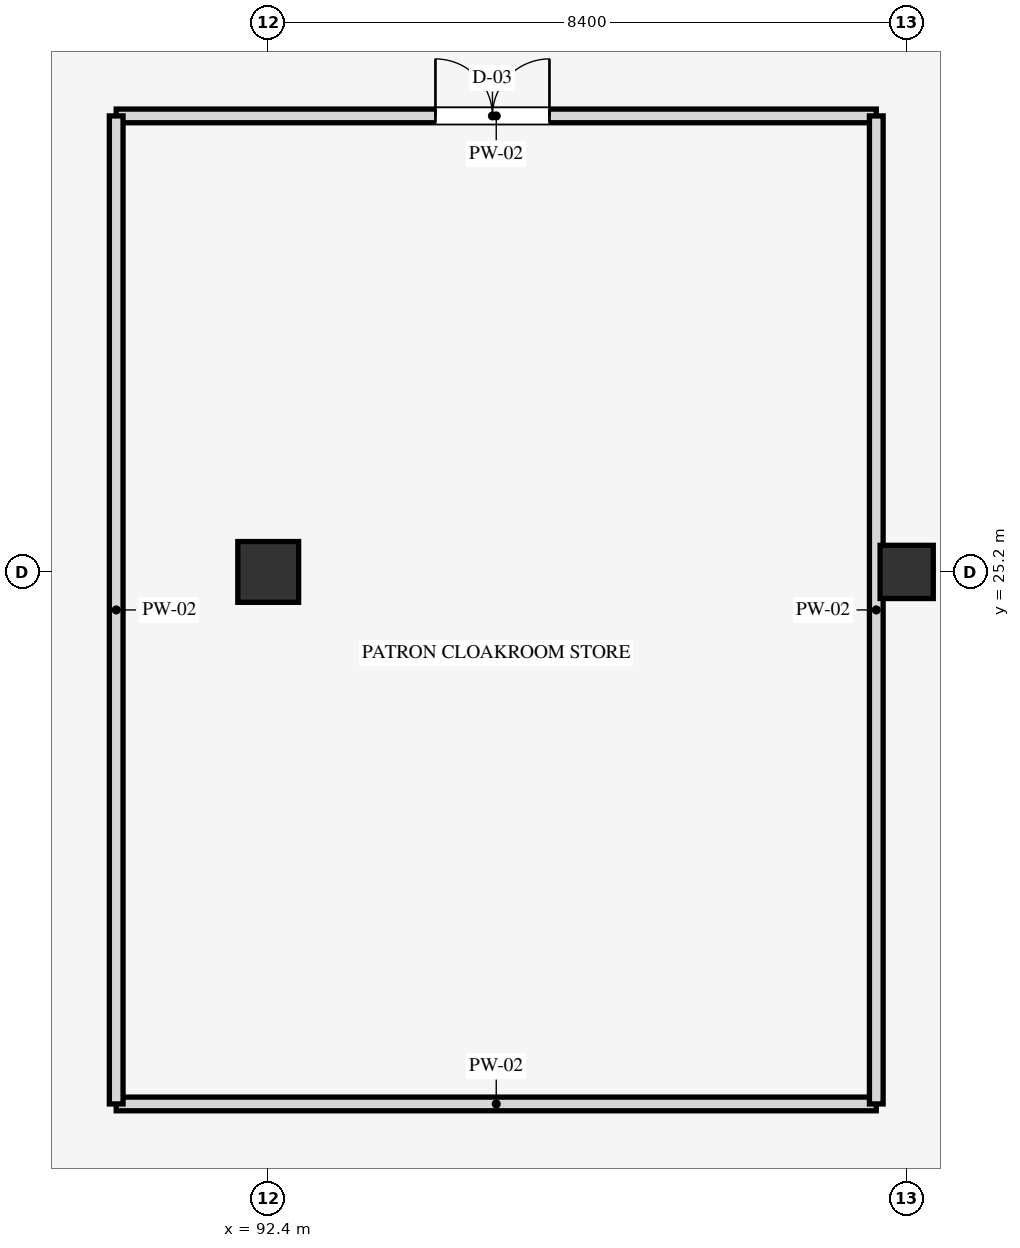
"""IFC4 building model, lengths in metres.
Left out: names, types, materials, properties, quantities, classifications, styles, units other than length and angle.
Written with IfcOpenShell. Run it as: python <this file> out.ifc"""

import sys

from ifc_helpers import new_model, si_unit, direction, frame, frame_2d, origin, origin_2d, place, context, subcontext, project, spatial, rectangle, extrude, element, fill, save


model = new_model("IFC4")
c1 = context("Model", 3, precision=1e-05, world=origin(), true_north=direction((0.0, 1.0)))
c2 = subcontext(c1, "Body", "Model", "MODEL_VIEW")
j1 = project(units=[si_unit("LENGTHUNIT", "METRE"), si_unit("PLANEANGLEUNIT", "RADIAN")], contexts=[c1])
p1 = place(None, origin())
s1 = spatial("IfcSite", under=j1, at=p1, CompositionType="ELEMENT")
p2 = place(p1, origin())
s2 = spatial("IfcBuilding", under=s1, at=p2, CompositionType="ELEMENT")
p3 = place(p2, origin())
s3 = spatial("IfcBuildingStorey", under=s2, at=p3, CompositionType="ELEMENT", Elevation=0.0)
p4 = place(p3, frame((92.4, 25.2, 0.0), z_axis=(0.0, 0.0, 1.0), x_axis=(1.0, 0.0, 0.0)))
e1 = element("IfcColumn", 1, at=p4, inside=s3, PredefinedType="COLUMN", context=c2, shape_type="SweptSolid", body=[
    extrude(rectangle(XDim=0.8, YDim=0.8, at=origin_2d()), origin(), (0.0, 0.0, 1.0), 5.4),
])
p5 = place(p3, frame((100.8, 25.2, 0.0), z_axis=(0.0, 0.0, 1.0), x_axis=(1.0, 0.0, 0.0)))
e2 = element("IfcColumn", 2, at=p5, inside=s3, PredefinedType="COLUMN", context=c2, shape_type="SweptSolid", body=[
    extrude(rectangle(XDim=0.7, YDim=0.7, at=origin_2d()), origin(), (0.0, 0.0, 1.0), 5.4),
])
p6 = place(p3, frame((90.4, 18.2, 0.0), z_axis=(0.0, 0.0, 1.0), x_axis=(1.0, 0.0, 0.0)))
e3 = element("IfcWall", 3, at=p6, inside=s3, PredefinedType="PARTITIONING", context=c2, shape_type="SweptSolid", body=[
    extrude(rectangle(XDim=10.0, YDim=0.18, at=frame_2d((5.0, 0.0))), origin(), (0.0, 0.0, 1.0), 4.44),
])
p7 = place(p3, frame((90.4, 31.2, 0.0), z_axis=(0.0, 0.0, 1.0), x_axis=(1.0, 0.0, 0.0)))
e4 = element("IfcWall", 4, at=p7, inside=s3, PredefinedType="PARTITIONING", context=c2, shape_type="SweptSolid", body=[
    extrude(rectangle(XDim=10.0, YDim=0.18, at=frame_2d((5.0, 0.0))), origin(), (0.0, 0.0, 1.0), 4.44),
])
p8 = place(p7, frame((4.2, 0.0, 0.0)))
e5 = element("IfcOpeningElement", 5, at=p8, cuts=e4, PredefinedType="OPENING", context=c2, shape_type="SweptSolid", body=[
    extrude(rectangle(XDim=1.5, YDim=2.2, at=frame_2d((0.75, 1.1))), frame((0.0, 0.1, 0.0), z_axis=(0.0, -1.0, 0.0), x_axis=(1.0, 0.0, 0.0)), (0.0, 0.0, 1.0), 0.2),
])
for number, where, z_axis, x_axis in (
    (6, (90.4, 18.2, 0.0), (0.0, 0.0, 1.0), (0.0, 1.0, 0.0)),
    (7, (100.4, 18.2, 0.0), (0.0, 0.0, 1.0), (0.0, 1.0, 0.0)),
):
    element("IfcWall", number, at=place(p3, frame(where, z_axis=z_axis, x_axis=x_axis)), inside=s3, PredefinedType="PARTITIONING", context=c2, shape_type="SweptSolid", body=[
        extrude(rectangle(XDim=13.0, YDim=0.18, at=frame_2d((6.5, 0.0))), origin(), (0.0, 0.0, 1.0), 4.44),
    ])
p9 = place(p8, origin())
e8 = element("IfcDoor", 8, at=p9, inside=s3, OperationType="DOUBLE_DOOR_SINGLE_SWING", PredefinedType="DOOR", context=c2, shape_type="SweptSolid", body=[
    extrude(rectangle(XDim=1.5, YDim=2.2, at=frame_2d((0.75, 1.1))), frame((0.0, 0.025, 0.0), z_axis=(0.0, -1.0, 0.0), x_axis=(1.0, 0.0, 0.0)), (0.0, 0.0, 1.0), 0.05),
])
fill(e5, e8)
save(model, sys.argv[1])
